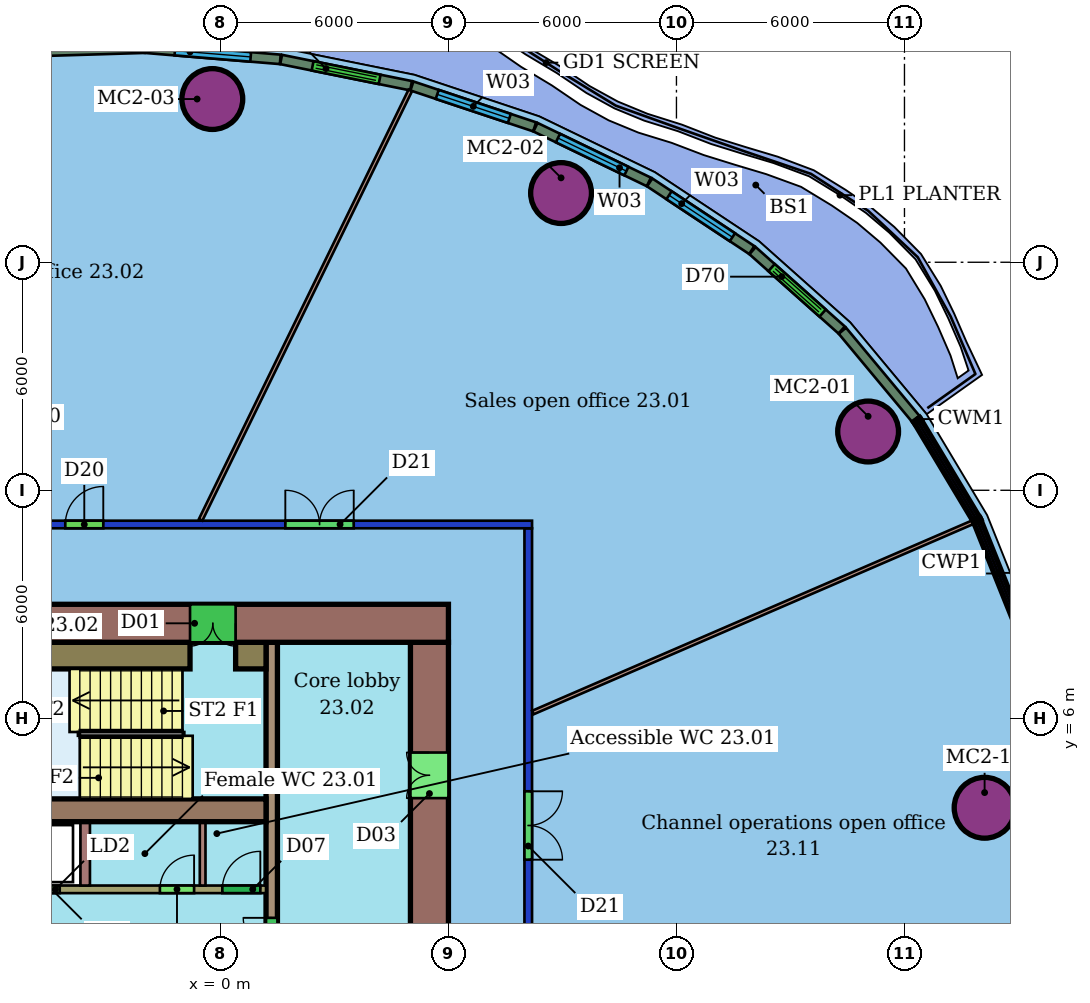
"""IFC4 building model, lengths in metres.
Left out: names, types, materials, properties, quantities, classifications, styles, units other than length and angle.
Written with IfcOpenShell. Run it as: python <this file> out.ifc"""

import sys

from ifc_helpers import new_model, si_unit, direction, frame, frame_2d, origin, origin_2d, place, context, subcontext, project, spatial, rectangle, hollow_circle, extrude, element, fill, save


model = new_model("IFC4")
c1 = context("Model", 3, precision=1e-05, world=origin(), true_north=direction((0.0, 1.0)))
c2 = subcontext(c1, "Body", "Model", "MODEL_VIEW")
j1 = project(units=[si_unit("LENGTHUNIT", "METRE"), si_unit("PLANEANGLEUNIT", "RADIAN")], contexts=[c1])
p1 = place(None, origin())
s1 = spatial("IfcSite", under=j1, at=p1, CompositionType="ELEMENT")
p2 = place(p1, origin())
s2 = spatial("IfcBuilding", under=s1, at=p2, CompositionType="ELEMENT")
p3 = place(p2, frame((0.0, 0.0, 103.0)))
s3 = spatial("IfcBuildingStorey", under=s2, at=p3, CompositionType="ELEMENT", Elevation=103.0)
for number, where, z_axis, x_axis in (
    (1, (17.043, 13.547, 0.0), (0.0, 0.0, 1.0), (1.0, 0.0, 0.0)),
    (2, (8.963, 19.821, 0.0), (0.0, 0.0, 1.0), (1.0, 0.0, 0.0)),
    (3, (-0.213, 22.294, 0.0), (0.0, 0.0, 1.0), (1.0, 0.0, 0.0)),
    (4, (20.109, 3.646, 0.0), (0.0, 0.0, 1.0), (1.0, 0.0, 0.0)),
):
    element("IfcColumn", number, at=place(p3, frame(where, z_axis=z_axis, x_axis=x_axis)), inside=s3, PredefinedType="COLUMN", context=c2, shape_type="SweptSolid", body=[
        extrude(hollow_circle(Radius=0.8, WallThickness=0.055, at=origin_2d()), origin(), (0.0, 0.0, 1.0), 3.45),
    ])
p4 = place(p3, frame((-20.2, 11.1, 0.0), z_axis=(0.0, 0.0, 1.0), x_axis=(1.0, 0.0, 0.0)))
e5 = element("IfcWall", 5, at=p4, inside=s3, PredefinedType="PARTITIONING", context=c2, shape_type="SweptSolid", body=[
    extrude(rectangle(XDim=28.4, YDim=0.2, at=frame_2d((14.2, 0.0))), origin(), (0.0, 0.0, 1.0), 3.0),
])
p5 = place(p4, frame((21.908, 0.0, 0.0)))
e6 = element("IfcOpeningElement", 6, at=p5, cuts=e5, PredefinedType="OPENING", context=c2, shape_type="SweptSolid", body=[
    extrude(rectangle(XDim=1.8, YDim=2.1, at=frame_2d((0.9, 1.05))), frame((0.0, 0.11, 0.0), z_axis=(0.0, -1.0, 0.0), x_axis=(1.0, 0.0, 0.0)), (0.0, 0.0, 1.0), 0.22),
])
p6 = place(p4, frame((16.118, 0.0, 0.0)))
e7 = element("IfcOpeningElement", 7, at=p6, cuts=e5, PredefinedType="OPENING", context=c2, shape_type="SweptSolid", body=[
    extrude(rectangle(XDim=1.0, YDim=2.1, at=frame_2d((0.5, 1.05))), frame((0.0, 0.11, 0.0), z_axis=(0.0, -1.0, 0.0), x_axis=(1.0, 0.0, 0.0)), (0.0, 0.0, 1.0), 0.22),
])
p7 = place(p4, frame((8.5, 0.0, 0.0)))
e8 = element("IfcOpeningElement", 8, at=p7, cuts=e5, PredefinedType="OPENING", context=c2, shape_type="SweptSolid", body=[
    extrude(rectangle(XDim=1.0, YDim=2.4, at=frame_2d((0.5, 1.2))), frame((0.0, 0.11, 0.0), z_axis=(0.0, -1.0, 0.0), x_axis=(1.0, 0.0, 0.0)), (0.0, 0.0, 1.0), 0.22),
])
p8 = place(p4, frame((3.55, 0.0, 0.0)))
e9 = element("IfcOpeningElement", 9, at=p8, cuts=e5, PredefinedType="OPENING", context=c2, shape_type="SweptSolid", body=[
    extrude(rectangle(XDim=0.9, YDim=2.1, at=frame_2d((0.45, 1.05))), frame((0.0, 0.11, 0.0), z_axis=(0.0, -1.0, 0.0), x_axis=(1.0, 0.0, 0.0)), (0.0, 0.0, 1.0), 0.22),
])
p9 = place(p3, frame((8.1, 11.0, 0.0), z_axis=(0.0, 0.0, 1.0), x_axis=(0.0, -1.0, 0.0)))
e10 = element("IfcWall", 10, at=p9, inside=s3, PredefinedType="PARTITIONING", context=c2, shape_type="SweptSolid", body=[
    extrude(rectangle(XDim=22.0, YDim=0.2, at=frame_2d((11.0, 0.0))), origin(), (0.0, 0.0, 1.0), 3.0),
])
p10 = place(p9, frame((14.499, 0.0, 0.0)))
e11 = element("IfcOpeningElement", 11, at=p10, cuts=e10, PredefinedType="OPENING", context=c2, shape_type="SweptSolid", body=[
    extrude(rectangle(XDim=1.5, YDim=2.1, at=frame_2d((0.75, 1.05))), frame((0.0, 0.11, 0.0), z_axis=(0.0, -1.0, 0.0), x_axis=(1.0, 0.0, 0.0)), (0.0, 0.0, 1.0), 0.22),
])
p11 = place(p9, frame((6.92, 0.0, 0.0)))
e12 = element("IfcOpeningElement", 12, at=p11, cuts=e10, PredefinedType="OPENING", context=c2, shape_type="SweptSolid", body=[
    extrude(rectangle(XDim=1.8, YDim=2.1, at=frame_2d((0.9, 1.05))), frame((0.0, 0.11, 0.0), z_axis=(0.0, -1.0, 0.0), x_axis=(1.0, 0.0, 0.0)), (0.0, 0.0, 1.0), 0.22),
])
p12 = place(p3, frame((19.794, 11.158, 0.0), z_axis=(0.0, 0.0, 1.0), x_axis=(-0.917806893713, -0.397027084533, 0.0)))
e13 = element("IfcWall", 13, at=p12, inside=s3, PredefinedType="PARTITIONING", context=c2, shape_type="SweptSolid", body=[
    extrude(rectangle(XDim=12.61, YDim=0.1, at=frame_2d((6.305, 0.0))), origin(), (0.0, 0.0, 1.0), 3.45),
])
p13 = place(p3, frame((4.996, 22.521, 0.0), z_axis=(0.0, 0.0, 1.0), x_axis=(-0.438736131728, -0.898615939496, 0.0)))
e14 = element("IfcWall", 14, at=p13, inside=s3, PredefinedType="PARTITIONING", context=c2, shape_type="SweptSolid", body=[
    extrude(rectangle(XDim=12.574, YDim=0.1, at=frame_2d((6.287, 0.0))), origin(), (0.0, 0.0, 1.0), 3.45),
])
p14 = place(p3, frame((18.304, 13.87, 0.0), z_axis=(0.0, 0.0, 1.0), x_axis=(-0.639859311978, 0.768492069494, 0.0)))
e15 = element("IfcWall", 15, at=p14, inside=s3, PredefinedType="SOLIDWALL", context=c2, shape_type="SweptSolid", body=[
    extrude(rectangle(XDim=3.029, YDim=0.25, at=frame_2d((1.515, 0.0))), origin(), (0.0, 0.0, 1.0), 3.05),
])
p15 = place(p3, frame((16.347, 16.218, 0.0), z_axis=(0.0, 0.0, 1.0), x_axis=(-0.746859935175, 0.664981381116, 0.0)))
e16 = element("IfcWall", 16, at=p15, inside=s3, PredefinedType="SOLIDWALL", context=c2, shape_type="SweptSolid", body=[
    extrude(rectangle(XDim=3.14, YDim=0.25, at=frame_2d((1.57, 0.0))), origin(), (0.0, 0.0, 1.0), 3.05),
])
p16 = place(p15, frame((0.67, 0.0, 0.0)))
e17 = element("IfcOpeningElement", 17, at=p16, cuts=e16, PredefinedType="OPENING", context=c2, shape_type="SweptSolid", body=[
    extrude(rectangle(XDim=1.8, YDim=2.4, at=frame_2d((0.9, 1.2))), frame((0.0, 0.135, 0.0), z_axis=(0.0, -1.0, 0.0), x_axis=(1.0, 0.0, 0.0)), (0.0, 0.0, 1.0), 0.27),
])
p17 = place(p3, frame((13.982, 18.321, 0.0), z_axis=(0.0, 0.0, 1.0), x_axis=(-0.833643452757, 0.552302990827, 0.0)))
e18 = element("IfcWall", 18, at=p17, inside=s3, PredefinedType="SOLIDWALL", context=c2, shape_type="SweptSolid", body=[
    extrude(rectangle(XDim=3.223, YDim=0.25, at=frame_2d((1.611, 0.0))), origin(), (0.0, 0.0, 1.0), 3.05),
])
p18 = place(p17, frame((0.611, 0.0, 0.9)))
e19 = element("IfcOpeningElement", 19, at=p18, cuts=e18, PredefinedType="OPENING", context=c2, shape_type="SweptSolid", body=[
    extrude(rectangle(XDim=2.0, YDim=2.1, at=frame_2d((1.0, 1.05))), frame((0.0, 0.135, 0.0), z_axis=(0.0, -1.0, 0.0), x_axis=(1.0, 0.0, 0.0)), (0.0, 0.0, 1.0), 0.27),
])
p19 = place(p3, frame((11.274, 20.114, 0.0), z_axis=(0.0, 0.0, 1.0), x_axis=(-0.900502882427, 0.43485004167, 0.0)))
e20 = element("IfcWall", 20, at=p19, inside=s3, PredefinedType="SOLIDWALL", context=c2, shape_type="SweptSolid", body=[
    extrude(rectangle(XDim=3.313, YDim=0.25, at=frame_2d((1.656, 0.0))), origin(), (0.0, 0.0, 1.0), 3.05),
])
p20 = place(p19, frame((0.656, 0.0, 0.9)))
e21 = element("IfcOpeningElement", 21, at=p20, cuts=e20, PredefinedType="OPENING", context=c2, shape_type="SweptSolid", body=[
    extrude(rectangle(XDim=2.0, YDim=2.1, at=frame_2d((1.0, 1.05))), frame((0.0, 0.135, 0.0), z_axis=(0.0, -1.0, 0.0), x_axis=(1.0, 0.0, 0.0)), (0.0, 0.0, 1.0), 0.27),
])
p21 = place(p3, frame((8.268, 21.563, 0.0), z_axis=(0.0, 0.0, 1.0), x_axis=(-0.948762176605, 0.315991031903, 0.0)))
e22 = element("IfcWall", 22, at=p21, inside=s3, PredefinedType="SOLIDWALL", context=c2, shape_type="SweptSolid", body=[
    extrude(rectangle(XDim=3.403, YDim=0.25, at=frame_2d((1.702, 0.0))), origin(), (0.0, 0.0, 1.0), 3.05),
])
p22 = place(p21, frame((0.702, 0.0, 0.9)))
e23 = element("IfcOpeningElement", 23, at=p22, cuts=e22, PredefinedType="OPENING", context=c2, shape_type="SweptSolid", body=[
    extrude(rectangle(XDim=2.0, YDim=2.1, at=frame_2d((1.0, 1.05))), frame((0.0, 0.135, 0.0), z_axis=(0.0, -1.0, 0.0), x_axis=(1.0, 0.0, 0.0)), (0.0, 0.0, 1.0), 0.27),
])
p23 = place(p3, frame((5.017, 22.645, 0.0), z_axis=(0.0, 0.0, 1.0), x_axis=(-0.980191158743, 0.198053761191, 0.0)))
e24 = element("IfcWall", 24, at=p23, inside=s3, PredefinedType="SOLIDWALL", context=c2, shape_type="SweptSolid", body=[
    extrude(rectangle(XDim=3.489, YDim=0.25, at=frame_2d((1.744, 0.0))), origin(), (0.0, 0.0, 1.0), 3.05),
])
p24 = place(p23, frame((0.844, 0.0, 0.0)))
e25 = element("IfcOpeningElement", 25, at=p24, cuts=e24, PredefinedType="OPENING", context=c2, shape_type="SweptSolid", body=[
    extrude(rectangle(XDim=1.8, YDim=2.4, at=frame_2d((0.9, 1.2))), frame((0.0, 0.135, 0.0), z_axis=(0.0, -1.0, 0.0), x_axis=(1.0, 0.0, 0.0)), (0.0, 0.0, 1.0), 0.27),
])
p25 = place(p3, frame((1.575, 23.339, 0.0), z_axis=(0.0, 0.0, 1.0), x_axis=(-0.996602699612, 0.082359329318, 0.0)))
e26 = element("IfcWall", 26, at=p25, inside=s3, PredefinedType="SOLIDWALL", context=c2, shape_type="SweptSolid", body=[
    extrude(rectangle(XDim=3.563, YDim=0.25, at=frame_2d((1.782, 0.0))), origin(), (0.0, 0.0, 1.0), 3.05),
])
p26 = place(p25, frame((0.781, 0.0, 0.9)))
e27 = element("IfcOpeningElement", 27, at=p26, cuts=e26, PredefinedType="OPENING", context=c2, shape_type="SweptSolid", body=[
    extrude(rectangle(XDim=2.0, YDim=2.1, at=frame_2d((1.0, 1.05))), frame((0.0, 0.135, 0.0), z_axis=(0.0, -1.0, 0.0), x_axis=(1.0, 0.0, 0.0)), (0.0, 0.0, 1.0), 0.27),
])
p27 = place(p3, frame((-1.998, 23.633, 0.0), z_axis=(0.0, 0.0, 1.0), x_axis=(-0.999541179145, -0.030289126641, 0.0)))
e28 = element("IfcWall", 28, at=p27, inside=s3, PredefinedType="SOLIDWALL", context=c2, shape_type="SweptSolid", body=[
    extrude(rectangle(XDim=3.579, YDim=0.25, at=frame_2d((1.79, 0.0))), origin(), (0.0, 0.0, 1.0), 3.05),
])
p28 = place(p3, frame((6.0, 8.5, 0.0), z_axis=(0.0, 0.0, 1.0), x_axis=(-1.0, 0.0, 0.0)))
e29 = element("IfcWall", 29, at=p28, inside=s3, PredefinedType="SHEAR", context=c2, shape_type="SweptSolid", body=[
    extrude(rectangle(XDim=12.0, YDim=1.0, at=frame_2d((6.0, 0.0))), origin(), (0.0, 0.0, 1.0), 3.3),
])
p29 = place(p28, frame((5.6, 0.0, 0.0)))
e30 = element("IfcOpeningElement", 30, at=p29, cuts=e29, PredefinedType="OPENING", context=c2, shape_type="SweptSolid", body=[
    extrude(rectangle(XDim=1.2, YDim=2.1, at=frame_2d((0.6, 1.05))), frame((0.0, 0.51, 0.0), z_axis=(0.0, -1.0, 0.0), x_axis=(1.0, 0.0, 0.0)), (0.0, 0.0, 1.0), 1.02),
])
p30 = place(p3, frame((5.5, -8.0, 0.0), z_axis=(0.0, 0.0, 1.0), x_axis=(0.0, 1.0, 0.0)))
e31 = element("IfcWall", 31, at=p30, inside=s3, PredefinedType="SHEAR", context=c2, shape_type="SweptSolid", body=[
    extrude(rectangle(XDim=16.0, YDim=1.0, at=frame_2d((8.0, 0.0))), origin(), (0.0, 0.0, 1.0), 3.3),
])
p31 = place(p30, frame((2.9, 0.0, 0.0)))
e32 = element("IfcOpeningElement", 32, at=p31, cuts=e31, PredefinedType="OPENING", context=c2, shape_type="SweptSolid", body=[
    extrude(rectangle(XDim=1.2, YDim=2.1, at=frame_2d((0.6, 1.05))), frame((0.0, 0.51, 0.0), z_axis=(0.0, -1.0, 0.0), x_axis=(1.0, 0.0, 0.0)), (0.0, 0.0, 1.0), 1.02),
])
p32 = place(p30, frame((11.9, 0.0, 0.0)))
e33 = element("IfcOpeningElement", 33, at=p32, cuts=e31, PredefinedType="OPENING", context=c2, shape_type="SweptSolid", body=[
    extrude(rectangle(XDim=1.2, YDim=2.1, at=frame_2d((0.6, 1.05))), frame((0.0, 0.51, 0.0), z_axis=(0.0, -1.0, 0.0), x_axis=(1.0, 0.0, 0.0)), (0.0, 0.0, 1.0), 1.02),
])
p33 = place(p3, frame((-6.0, 3.58, 0.0), z_axis=(0.0, 0.0, 1.0), x_axis=(1.0, 0.0, 0.0)))
e34 = element("IfcWall", 34, at=p33, inside=s3, PredefinedType="SHEAR", context=c2, shape_type="SweptSolid", body=[
    extrude(rectangle(XDim=7.2, YDim=0.6, at=frame_2d((3.6, 0.0))), origin(), (0.0, 0.0, 1.0), 3.3),
])
p34 = place(p3, frame((1.35, -8.0, 0.0), z_axis=(0.0, 0.0, 1.0), x_axis=(0.0, 1.0, 0.0)))
e35 = element("IfcWall", 35, at=p34, inside=s3, PredefinedType="SHEAR", context=c2, shape_type="SweptSolid", body=[
    extrude(rectangle(XDim=16.0, YDim=0.3, at=frame_2d((8.0, 0.0))), origin(), (0.0, 0.0, 1.0), 3.3),
])
p35 = place(p34, frame((1.91, 0.0, 0.0)))
e36 = element("IfcOpeningElement", 36, at=p35, cuts=e35, PredefinedType="OPENING", context=c2, shape_type="SweptSolid", body=[
    extrude(rectangle(XDim=1.0, YDim=2.1, at=frame_2d((0.5, 1.05))), frame((0.0, 0.16, 0.0), z_axis=(0.0, -1.0, 0.0), x_axis=(1.0, 0.0, 0.0)), (0.0, 0.0, 1.0), 0.32),
])
p36 = place(p34, frame((7.25, 0.0, 0.0)))
e37 = element("IfcOpeningElement", 37, at=p36, cuts=e35, PredefinedType="OPENING", context=c2, shape_type="SweptSolid", body=[
    extrude(rectangle(XDim=1.5, YDim=2.1, at=frame_2d((0.75, 1.05))), frame((0.0, 0.16, 0.0), z_axis=(0.0, -1.0, 0.0), x_axis=(1.0, 0.0, 0.0)), (0.0, 0.0, 1.0), 0.32),
])
p37 = place(p3, frame((-13.2, 1.5, 0.0), z_axis=(0.0, 0.0, 1.0), x_axis=(1.0, 0.0, 0.0)))
e38 = element("IfcWall", 38, at=p37, inside=s3, PredefinedType="SHEAR", context=c2, shape_type="SweptSolid", body=[
    extrude(rectangle(XDim=14.4, YDim=0.2, at=frame_2d((7.2, 0.0))), origin(), (0.0, 0.0, 1.0), 3.3),
])
p38 = place(p37, frame((0.546, 0.0, 0.0)))
e39 = element("IfcOpeningElement", 39, at=p38, cuts=e38, PredefinedType="OPENING", context=c2, shape_type="SweptSolid", body=[
    extrude(rectangle(XDim=1.1, YDim=2.1, at=frame_2d((0.55, 1.05))), frame((0.0, 0.11, 0.0), z_axis=(0.0, -1.0, 0.0), x_axis=(1.0, 0.0, 0.0)), (0.0, 0.0, 1.0), 0.22),
])
p39 = place(p37, frame((2.988, 0.0, 0.0)))
e40 = element("IfcOpeningElement", 40, at=p39, cuts=e38, PredefinedType="OPENING", context=c2, shape_type="SweptSolid", body=[
    extrude(rectangle(XDim=1.1, YDim=2.1, at=frame_2d((0.55, 1.05))), frame((0.0, 0.11, 0.0), z_axis=(0.0, -1.0, 0.0), x_axis=(1.0, 0.0, 0.0)), (0.0, 0.0, 1.0), 0.22),
])
p40 = place(p37, frame((5.429, 0.0, 0.0)))
e41 = element("IfcOpeningElement", 41, at=p40, cuts=e38, PredefinedType="OPENING", context=c2, shape_type="SweptSolid", body=[
    extrude(rectangle(XDim=1.1, YDim=2.1, at=frame_2d((0.55, 1.05))), frame((0.0, 0.11, 0.0), z_axis=(0.0, -1.0, 0.0), x_axis=(1.0, 0.0, 0.0)), (0.0, 0.0, 1.0), 0.22),
])
p41 = place(p37, frame((7.871, 0.0, 0.0)))
e42 = element("IfcOpeningElement", 42, at=p41, cuts=e38, PredefinedType="OPENING", context=c2, shape_type="SweptSolid", body=[
    extrude(rectangle(XDim=1.1, YDim=2.1, at=frame_2d((0.55, 1.05))), frame((0.0, 0.11, 0.0), z_axis=(0.0, -1.0, 0.0), x_axis=(1.0, 0.0, 0.0)), (0.0, 0.0, 1.0), 0.22),
])
p42 = place(p37, frame((11.607, 0.0, 0.0)))
e43 = element("IfcOpeningElement", 43, at=p42, cuts=e38, PredefinedType="OPENING", context=c2, shape_type="SweptSolid", body=[
    extrude(rectangle(XDim=0.9, YDim=2.1, at=frame_2d((0.45, 1.05))), frame((0.0, 0.11, 0.0), z_axis=(0.0, -1.0, 0.0), x_axis=(1.0, 0.0, 0.0)), (0.0, 0.0, 1.0), 0.22),
])
p43 = place(p37, frame((13.25, 0.0, 0.0)))
e44 = element("IfcOpeningElement", 44, at=p43, cuts=e38, PredefinedType="OPENING", context=c2, shape_type="SweptSolid", body=[
    extrude(rectangle(XDim=1.0, YDim=2.1, at=frame_2d((0.5, 1.05))), frame((0.0, 0.11, 0.0), z_axis=(0.0, -1.0, 0.0), x_axis=(1.0, 0.0, 0.0)), (0.0, 0.0, 1.0), 0.22),
])
p44 = place(p3, frame((-5.85, 7.65, 0.0), z_axis=(0.0, 0.0, 1.0), x_axis=(1.0, 0.0, 0.0)))
e45 = element("IfcWall", 45, at=p44, inside=s3, PredefinedType="SHEAR", context=c2, shape_type="SweptSolid", body=[
    extrude(rectangle(XDim=5.05, YDim=0.7, at=frame_2d((2.525, 0.0))), origin(), (0.0, 0.0, 1.0), 3.3),
])
p45 = place(p3, frame((0.4, 7.65, 0.0), z_axis=(0.0, 0.0, 1.0), x_axis=(1.0, 0.0, 0.0)))
e46 = element("IfcWall", 46, at=p45, inside=s3, PredefinedType="SHEAR", context=c2, shape_type="SweptSolid", body=[
    extrude(rectangle(XDim=0.8, YDim=0.7, at=frame_2d((0.4, 0.0))), origin(), (0.0, 0.0, 1.0), 3.3),
])
p46 = place(p3, frame((-3.558, 1.6, 0.0), z_axis=(0.0, 0.0, 1.0), x_axis=(0.0, 1.0, 0.0)))
e47 = element("IfcWall", 47, at=p46, inside=s3, PredefinedType="SHEAR", context=c2, shape_type="SweptSolid", body=[
    extrude(rectangle(XDim=1.68, YDim=0.25, at=frame_2d((0.84, 0.0))), origin(), (0.0, 0.0, 1.0), 3.3),
])
p47 = place(p3, frame((-0.468, 1.6, 0.0), z_axis=(0.0, 0.0, 1.0), x_axis=(0.0, 1.0, 0.0)))
e48 = element("IfcWall", 48, at=p47, inside=s3, PredefinedType="PARTITIONING", context=c2, shape_type="SweptSolid", body=[
    extrude(rectangle(XDim=1.68, YDim=0.15, at=frame_2d((0.84, 0.0))), origin(), (0.0, 0.0, 1.0), 3.3),
])
p48 = place(p5, origin())
e49 = element("IfcDoor", 49, at=p48, inside=s3, OperationType="DOUBLE_DOOR_SINGLE_SWING", PredefinedType="DOOR", context=c2, shape_type="SweptSolid", body=[
    extrude(rectangle(XDim=1.8, YDim=2.1, at=frame_2d((0.9, 1.05))), frame((0.0, 0.025, 0.0), z_axis=(0.0, -1.0, 0.0), x_axis=(1.0, 0.0, 0.0)), (0.0, 0.0, 1.0), 0.05),
])
fill(e6, e49)
p49 = place(p6, origin())
e50 = element("IfcDoor", 50, at=p49, inside=s3, OperationType="SINGLE_SWING_RIGHT", PredefinedType="DOOR", context=c2, shape_type="SweptSolid", body=[
    extrude(rectangle(XDim=1.0, YDim=2.1, at=frame_2d((0.5, 1.05))), frame((0.0, 0.025, 0.0), z_axis=(0.0, -1.0, 0.0), x_axis=(1.0, 0.0, 0.0)), (0.0, 0.0, 1.0), 0.05),
])
fill(e7, e50)
p50 = place(p11, origin())
e51 = element("IfcDoor", 51, at=p50, inside=s3, OperationType="DOUBLE_DOOR_SINGLE_SWING", PredefinedType="DOOR", context=c2, shape_type="SweptSolid", body=[
    extrude(rectangle(XDim=1.8, YDim=2.1, at=frame_2d((0.9, 1.05))), frame((0.0, 0.025, 0.0), z_axis=(0.0, -1.0, 0.0), x_axis=(1.0, 0.0, 0.0)), (0.0, 0.0, 1.0), 0.05),
])
fill(e12, e51)
p51 = place(p16, origin())
e52 = element("IfcDoor", 52, at=p51, inside=s3, OperationType="DOUBLE_DOOR_SLIDING", PredefinedType="DOOR", context=c2, shape_type="SweptSolid", body=[
    extrude(rectangle(XDim=1.8, YDim=2.4, at=frame_2d((0.9, 1.2))), frame((0.0, 0.025, 0.0), z_axis=(0.0, -1.0, 0.0), x_axis=(1.0, 0.0, 0.0)), (0.0, 0.0, 1.0), 0.05),
])
fill(e17, e52)
p52 = place(p18, origin())
e53 = element("IfcWindow", 53, at=p52, inside=s3, PartitioningType="SINGLE_PANEL", PredefinedType="WINDOW", context=c2, shape_type="SweptSolid", body=[
    extrude(rectangle(XDim=2.0, YDim=2.1, at=frame_2d((1.0, 1.05))), frame((0.0, 0.03, 0.0), z_axis=(0.0, -1.0, 0.0), x_axis=(1.0, 0.0, 0.0)), (0.0, 0.0, 1.0), 0.06),
])
fill(e19, e53)
p53 = place(p20, origin())
e54 = element("IfcWindow", 54, at=p53, inside=s3, PartitioningType="SINGLE_PANEL", PredefinedType="WINDOW", context=c2, shape_type="SweptSolid", body=[
    extrude(rectangle(XDim=2.0, YDim=2.1, at=frame_2d((1.0, 1.05))), frame((0.0, 0.03, 0.0), z_axis=(0.0, -1.0, 0.0), x_axis=(1.0, 0.0, 0.0)), (0.0, 0.0, 1.0), 0.06),
])
fill(e21, e54)
p54 = place(p22, origin())
e55 = element("IfcWindow", 55, at=p54, inside=s3, PartitioningType="SINGLE_PANEL", PredefinedType="WINDOW", context=c2, shape_type="SweptSolid", body=[
    extrude(rectangle(XDim=2.0, YDim=2.1, at=frame_2d((1.0, 1.05))), frame((0.0, 0.03, 0.0), z_axis=(0.0, -1.0, 0.0), x_axis=(1.0, 0.0, 0.0)), (0.0, 0.0, 1.0), 0.06),
])
fill(e23, e55)
p55 = place(p24, origin())
e56 = element("IfcDoor", 56, at=p55, inside=s3, OperationType="DOUBLE_DOOR_SLIDING", PredefinedType="DOOR", context=c2, shape_type="SweptSolid", body=[
    extrude(rectangle(XDim=1.8, YDim=2.4, at=frame_2d((0.9, 1.2))), frame((0.0, 0.025, 0.0), z_axis=(0.0, -1.0, 0.0), x_axis=(1.0, 0.0, 0.0)), (0.0, 0.0, 1.0), 0.05),
])
fill(e25, e56)
p56 = place(p26, origin())
e57 = element("IfcWindow", 57, at=p56, inside=s3, PartitioningType="SINGLE_PANEL", PredefinedType="WINDOW", context=c2, shape_type="SweptSolid", body=[
    extrude(rectangle(XDim=2.0, YDim=2.1, at=frame_2d((1.0, 1.05))), frame((0.0, 0.03, 0.0), z_axis=(0.0, -1.0, 0.0), x_axis=(1.0, 0.0, 0.0)), (0.0, 0.0, 1.0), 0.06),
])
fill(e27, e57)
p57 = place(p29, origin())
e58 = element("IfcDoor", 58, at=p57, inside=s3, OperationType="DOUBLE_DOOR_SINGLE_SWING", PredefinedType="NOTDEFINED", context=c2, shape_type="SweptSolid", body=[
    extrude(rectangle(XDim=1.2, YDim=2.1, at=frame_2d((0.6, 1.05))), frame((0.0, 0.025, 0.0), z_axis=(0.0, -1.0, 0.0), x_axis=(1.0, 0.0, 0.0)), (0.0, 0.0, 1.0), 0.05),
])
fill(e30, e58)
p58 = place(p32, origin())
e59 = element("IfcDoor", 59, at=p58, inside=s3, OperationType="DOUBLE_DOOR_SINGLE_SWING", PredefinedType="NOTDEFINED", context=c2, shape_type="SweptSolid", body=[
    extrude(rectangle(XDim=1.2, YDim=2.1, at=frame_2d((0.6, 1.05))), frame((0.0, 0.025, 0.0), z_axis=(0.0, -1.0, 0.0), x_axis=(1.0, 0.0, 0.0)), (0.0, 0.0, 1.0), 0.05),
])
fill(e33, e59)
p59 = place(p36, origin())
e60 = element("IfcDoor", 60, at=p59, inside=s3, OperationType="DOUBLE_DOOR_SINGLE_SWING", PredefinedType="NOTDEFINED", context=c2, shape_type="SweptSolid", body=[
    extrude(rectangle(XDim=1.5, YDim=2.1, at=frame_2d((0.75, 1.05))), frame((0.0, 0.025, 0.0), z_axis=(0.0, -1.0, 0.0), x_axis=(1.0, 0.0, 0.0)), (0.0, 0.0, 1.0), 0.05),
])
fill(e37, e60)
p60 = place(p41, origin())
e61 = element("IfcDoor", 61, at=p60, inside=s3, OperationType="DOUBLE_DOOR_SLIDING", PredefinedType="NOTDEFINED", context=c2, shape_type="SweptSolid", body=[
    extrude(rectangle(XDim=1.1, YDim=2.1, at=frame_2d((0.55, 1.05))), frame((0.0, 0.025, 0.0), z_axis=(0.0, -1.0, 0.0), x_axis=(1.0, 0.0, 0.0)), (0.0, 0.0, 1.0), 0.05),
])
fill(e42, e61)
p61 = place(p42, origin())
e62 = element("IfcDoor", 62, at=p61, inside=s3, OperationType="SINGLE_SWING_RIGHT", PredefinedType="NOTDEFINED", context=c2, shape_type="SweptSolid", body=[
    extrude(rectangle(XDim=0.9, YDim=2.1, at=frame_2d((0.45, 1.05))), frame((0.0, 0.025, 0.0), z_axis=(0.0, -1.0, 0.0), x_axis=(1.0, 0.0, 0.0)), (0.0, 0.0, 1.0), 0.05),
])
fill(e43, e62)
p62 = place(p43, origin())
e63 = element("IfcDoor", 63, at=p62, inside=s3, OperationType="SINGLE_SWING_RIGHT", PredefinedType="NOTDEFINED", context=c2, shape_type="SweptSolid", body=[
    extrude(rectangle(XDim=1.0, YDim=2.1, at=frame_2d((0.5, 1.05))), frame((0.0, 0.025, 0.0), z_axis=(0.0, -1.0, 0.0), x_axis=(1.0, 0.0, 0.0)), (0.0, 0.0, 1.0), 0.05),
])
fill(e44, e63)
save(model, sys.argv[1])
